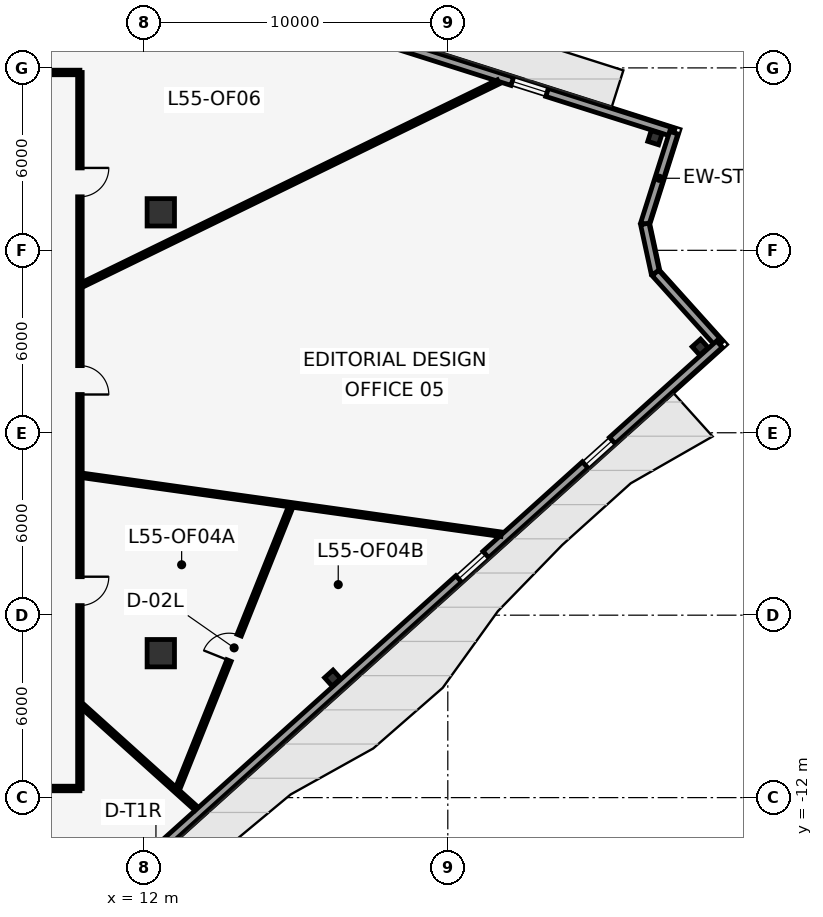
"""IFC4 building model, lengths in metres.
Left out: names, types, materials, properties, quantities, classifications, styles, units other than length and angle.
Written with IfcOpenShell. Run it as: python <this file> out.ifc"""

import sys

from ifc_helpers import new_model, si_unit, direction, frame, frame_2d, origin, origin_2d, place, context, subcontext, project, spatial, rectangle, i_section, extrude, element, fill, save


model = new_model("IFC4")
c1 = context("Model", 3, precision=1e-05, world=origin(), true_north=direction((0.0, 1.0)))
c2 = subcontext(c1, "Body", "Model", "MODEL_VIEW")
j1 = project(units=[si_unit("LENGTHUNIT", "METRE"), si_unit("PLANEANGLEUNIT", "RADIAN")], contexts=[c1])
p1 = place(None, origin())
s1 = spatial("IfcSite", under=j1, at=p1, CompositionType="ELEMENT")
p2 = place(p1, origin())
s2 = spatial("IfcBuilding", under=s1, at=p2, CompositionType="ELEMENT")
p3 = place(p2, frame((0.0, 0.0, 236.3)))
s3 = spatial("IfcBuildingStorey", under=s2, at=p3, CompositionType="ELEMENT", Elevation=236.3)
for number, where, z_axis, x_axis in (
    (1, (12.56, -7.25, 0.0), (0.0, 0.0, 1.0), (1.0, 0.0, 0.0)),
    (2, (12.56, 7.25, 0.0), (0.0, 0.0, 1.0), (1.0, 0.0, 0.0)),
):
    element("IfcColumn", number, at=place(p3, frame(where, z_axis=z_axis, x_axis=x_axis)), inside=s3, PredefinedType="COLUMN", context=c2, shape_type="SweptSolid", body=[
        extrude(rectangle(XDim=0.9, YDim=0.9, at=origin_2d()), origin(), (0.0, 0.0, 1.0), 4.1),
    ])
for number, where, z_axis, x_axis in (
    (3, (18.211, -8.07, 0.0), (0.0, 0.0, 1.0), (0.743, 0.669, 0.0)),
    (4, (30.301, 2.816, 0.0), (0.0, 0.0, 1.0), (0.743, 0.669, 0.0)),
    (5, (28.811, 9.706, 0.0), (0.0, 0.0, 1.0), (-0.953, 0.303, 0.0)),
):
    element("IfcColumn", number, at=place(p3, frame(where, z_axis=z_axis, x_axis=x_axis)), inside=s3, PredefinedType="COLUMN", context=c2, shape_type="SweptSolid", body=[
        extrude(i_section(OverallWidth=0.373, OverallDepth=0.373, WebThickness=0.016, FlangeThickness=0.026, at=origin_2d()), origin(), (0.0, 0.0, 1.0), 4.1),
    ])
p4 = place(p3, frame((-17.407, 24.748, 0.0), z_axis=(0.0, 0.0, 1.0), x_axis=(0.953082756031, -0.302709861346, 0.0)))
e6 = element("IfcWall", 6, at=p4, inside=s3, PredefinedType="STANDARD", context=c2, shape_type="SweptSolid", body=[
    extrude(rectangle(XDim=49.145, YDim=0.28, at=frame_2d((24.573, 0.0))), origin(), (0.0, 0.0, 1.0), 3.85),
])
p5 = place(p4, frame((24.073, 0.0, 0.0)))
e7 = element("IfcOpeningElement", 7, at=p5, cuts=e6, PredefinedType="OPENING", context=c2, shape_type="SweptSolid", body=[
    extrude(rectangle(XDim=1.0, YDim=2.15, at=frame_2d((0.5, 1.075))), frame((0.0, 0.15, 0.0), z_axis=(0.0, -1.0, 0.0), x_axis=(1.0, 0.0, 0.0)), (0.0, 0.0, 1.0), 0.3),
])
p6 = place(p4, frame((4.373, 0.0, 0.85)))
e8 = element("IfcOpeningElement", 8, at=p6, cuts=e6, PredefinedType="OPENING", context=c2, shape_type="SweptSolid", body=[
    extrude(rectangle(XDim=1.2, YDim=2.2, at=frame_2d((0.6, 1.1))), frame((0.0, 0.15, 0.0), z_axis=(0.0, -1.0, 0.0), x_axis=(1.0, 0.0, 0.0)), (0.0, 0.0, 1.0), 0.3),
])
p7 = place(p4, frame((9.973, 0.0, 0.85)))
e9 = element("IfcOpeningElement", 9, at=p7, cuts=e6, PredefinedType="OPENING", context=c2, shape_type="SweptSolid", body=[
    extrude(rectangle(XDim=1.2, YDim=2.2, at=frame_2d((0.6, 1.1))), frame((0.0, 0.15, 0.0), z_axis=(0.0, -1.0, 0.0), x_axis=(1.0, 0.0, 0.0)), (0.0, 0.0, 1.0), 0.3),
])
p8 = place(p4, frame((21.173, 0.0, 0.85)))
e10 = element("IfcOpeningElement", 10, at=p8, cuts=e6, PredefinedType="OPENING", context=c2, shape_type="SweptSolid", body=[
    extrude(rectangle(XDim=1.2, YDim=2.2, at=frame_2d((0.6, 1.1))), frame((0.0, 0.15, 0.0), z_axis=(0.0, -1.0, 0.0), x_axis=(1.0, 0.0, 0.0)), (0.0, 0.0, 1.0), 0.3),
])
p9 = place(p4, frame((37.973, 0.0, 0.85)))
e11 = element("IfcOpeningElement", 11, at=p9, cuts=e6, PredefinedType="OPENING", context=c2, shape_type="SweptSolid", body=[
    extrude(rectangle(XDim=1.2, YDim=2.2, at=frame_2d((0.6, 1.1))), frame((0.0, 0.15, 0.0), z_axis=(0.0, -1.0, 0.0), x_axis=(1.0, 0.0, 0.0)), (0.0, 0.0, 1.0), 0.3),
])
p10 = place(p4, frame((43.573, 0.0, 0.85)))
e12 = element("IfcOpeningElement", 12, at=p10, cuts=e6, PredefinedType="OPENING", context=c2, shape_type="SweptSolid", body=[
    extrude(rectangle(XDim=1.2, YDim=2.2, at=frame_2d((0.6, 1.1))), frame((0.0, 0.15, 0.0), z_axis=(0.0, -1.0, 0.0), x_axis=(1.0, 0.0, 0.0)), (0.0, 0.0, 1.0), 0.3),
])
p11 = place(p3, frame((29.432, 9.871, 0.0), z_axis=(0.0, 0.0, 1.0), x_axis=(-0.30264059672, -0.953104752489, 0.0)))
e13 = element("IfcWall", 13, at=p11, inside=s3, PredefinedType="STANDARD", context=c2, shape_type="SweptSolid", body=[
    extrude(rectangle(XDim=3.15, YDim=0.28, at=frame_2d((1.575, 0.0))), origin(), (0.0, 0.0, 1.0), 3.85),
])
p12 = place(p3, frame((28.479, 6.868, 0.0), z_axis=(0.0, 0.0, 1.0), x_axis=(0.211126358094, -0.977458777094, 0.0)))
e14 = element("IfcWall", 14, at=p12, inside=s3, PredefinedType="STANDARD", context=c2, shape_type="SweptSolid", body=[
    extrude(rectangle(XDim=1.649, YDim=0.28, at=frame_2d((0.824, 0.0))), origin(), (0.0, 0.0, 1.0), 3.85),
])
p13 = place(p3, frame((28.827, 5.257, 0.0), z_axis=(0.0, 0.0, 1.0), x_axis=(0.669127439782, -0.743147676663, 0.0)))
e15 = element("IfcWall", 15, at=p13, inside=s3, PredefinedType="STANDARD", context=c2, shape_type="SweptSolid", body=[
    extrude(rectangle(XDim=3.15, YDim=0.28, at=frame_2d((1.575, 0.0))), origin(), (0.0, 0.0, 1.0), 3.85),
])
p14 = place(p3, frame((30.935, 2.916, 0.0), z_axis=(0.0, 0.0, 1.0), x_axis=(-0.743143233829, -0.66913237406, 0.0)))
e16 = element("IfcWall", 16, at=p14, inside=s3, PredefinedType="STANDARD", context=c2, shape_type="SweptSolid", body=[
    extrude(rectangle(XDim=49.88, YDim=0.28, at=frame_2d((24.94, 0.0))), origin(), (0.0, 0.0, 1.0), 3.85),
])
p15 = place(p14, frame((24.44, 0.0, 0.0)))
e17 = element("IfcOpeningElement", 17, at=p15, cuts=e16, PredefinedType="OPENING", context=c2, shape_type="SweptSolid", body=[
    extrude(rectangle(XDim=1.0, YDim=2.15, at=frame_2d((0.5, 1.075))), frame((0.0, 0.15, 0.0), z_axis=(0.0, -1.0, 0.0), x_axis=(1.0, 0.0, 0.0)), (0.0, 0.0, 1.0), 0.3),
])
p16 = place(p14, frame((4.74, 0.0, 0.85)))
e18 = element("IfcOpeningElement", 18, at=p16, cuts=e16, PredefinedType="OPENING", context=c2, shape_type="SweptSolid", body=[
    extrude(rectangle(XDim=1.2, YDim=2.2, at=frame_2d((0.6, 1.1))), frame((0.0, 0.15, 0.0), z_axis=(0.0, -1.0, 0.0), x_axis=(1.0, 0.0, 0.0)), (0.0, 0.0, 1.0), 0.3),
])
p17 = place(p14, frame((10.34, 0.0, 0.85)))
e19 = element("IfcOpeningElement", 19, at=p17, cuts=e16, PredefinedType="OPENING", context=c2, shape_type="SweptSolid", body=[
    extrude(rectangle(XDim=1.2, YDim=2.2, at=frame_2d((0.6, 1.1))), frame((0.0, 0.15, 0.0), z_axis=(0.0, -1.0, 0.0), x_axis=(1.0, 0.0, 0.0)), (0.0, 0.0, 1.0), 0.3),
])
p18 = place(p14, frame((27.14, 0.0, 0.85)))
e20 = element("IfcOpeningElement", 20, at=p18, cuts=e16, PredefinedType="OPENING", context=c2, shape_type="SweptSolid", body=[
    extrude(rectangle(XDim=1.2, YDim=2.2, at=frame_2d((0.6, 1.1))), frame((0.0, 0.15, 0.0), z_axis=(0.0, -1.0, 0.0), x_axis=(1.0, 0.0, 0.0)), (0.0, 0.0, 1.0), 0.3),
])
p19 = place(p14, frame((38.34, 0.0, 0.85)))
e21 = element("IfcOpeningElement", 21, at=p19, cuts=e16, PredefinedType="OPENING", context=c2, shape_type="SweptSolid", body=[
    extrude(rectangle(XDim=1.2, YDim=2.2, at=frame_2d((0.6, 1.1))), frame((0.0, 0.15, 0.0), z_axis=(0.0, -1.0, 0.0), x_axis=(1.0, 0.0, 0.0)), (0.0, 0.0, 1.0), 0.3),
])
p20 = place(p14, frame((43.94, 0.0, 0.85)))
e22 = element("IfcOpeningElement", 22, at=p20, cuts=e16, PredefinedType="OPENING", context=c2, shape_type="SweptSolid", body=[
    extrude(rectangle(XDim=1.2, YDim=2.2, at=frame_2d((0.6, 1.1))), frame((0.0, 0.15, 0.0), z_axis=(0.0, -1.0, 0.0), x_axis=(1.0, 0.0, 0.0)), (0.0, 0.0, 1.0), 0.3),
])
p21 = place(p3, frame((-2.22, 11.85, 0.0), z_axis=(0.0, 0.0, 1.0), x_axis=(1.0, 0.0, 0.0)))
e23 = element("IfcWall", 23, at=p21, inside=s3, PredefinedType="PARTITIONING", context=c2, shape_type="SweptSolid", body=[
    extrude(rectangle(XDim=12.12, YDim=0.15, at=frame_2d((6.06, 0.0))), origin(), (0.0, 0.0, 1.0), 3.85),
])
p22 = place(p21, frame((4.774, 0.0, 0.0)))
e24 = element("IfcOpeningElement", 24, at=p22, cuts=e23, PredefinedType="OPENING", context=c2, shape_type="SweptSolid", body=[
    extrude(rectangle(XDim=0.95, YDim=2.15, at=frame_2d((0.475, 1.075))), frame((0.0, 0.085, 0.0), z_axis=(0.0, -1.0, 0.0), x_axis=(1.0, 0.0, 0.0)), (0.0, 0.0, 1.0), 0.17),
])
p23 = place(p3, frame((9.9, 11.85, 0.0), z_axis=(0.0, 0.0, 1.0), x_axis=(0.0, -1.0, 0.0)))
e25 = element("IfcWall", 25, at=p23, inside=s3, PredefinedType="PARTITIONING", context=c2, shape_type="SweptSolid", body=[
    extrude(rectangle(XDim=23.55, YDim=0.15, at=frame_2d((11.775, 0.0))), origin(), (0.0, 0.0, 1.0), 3.85),
])
p24 = place(p23, frame((16.585, 0.0, 0.0)))
e26 = element("IfcOpeningElement", 26, at=p24, cuts=e25, PredefinedType="OPENING", context=c2, shape_type="SweptSolid", body=[
    extrude(rectangle(XDim=0.95, YDim=2.15, at=frame_2d((0.475, 1.075))), frame((0.0, 0.085, 0.0), z_axis=(0.0, -1.0, 0.0), x_axis=(1.0, 0.0, 0.0)), (0.0, 0.0, 1.0), 0.17),
])
p25 = place(p23, frame((9.642, 0.0, 0.0)))
e27 = element("IfcOpeningElement", 27, at=p25, cuts=e25, PredefinedType="OPENING", context=c2, shape_type="SweptSolid", body=[
    extrude(rectangle(XDim=0.95, YDim=2.15, at=frame_2d((0.475, 1.075))), frame((0.0, 0.085, 0.0), z_axis=(0.0, -1.0, 0.0), x_axis=(1.0, 0.0, 0.0)), (0.0, 0.0, 1.0), 0.17),
])
p26 = place(p23, frame((3.14, 0.0, 0.0)))
e28 = element("IfcOpeningElement", 28, at=p26, cuts=e25, PredefinedType="OPENING", context=c2, shape_type="SweptSolid", body=[
    extrude(rectangle(XDim=0.95, YDim=2.15, at=frame_2d((0.475, 1.075))), frame((0.0, 0.085, 0.0), z_axis=(0.0, -1.0, 0.0), x_axis=(1.0, 0.0, 0.0)), (0.0, 0.0, 1.0), 0.17),
])
p27 = place(p3, frame((9.9, -11.7, 0.0), z_axis=(0.0, 0.0, 1.0), x_axis=(-1.0, 0.0, 0.0)))
e29 = element("IfcWall", 29, at=p27, inside=s3, PredefinedType="PARTITIONING", context=c2, shape_type="SweptSolid", body=[
    extrude(rectangle(XDim=12.12, YDim=0.15, at=frame_2d((6.06, 0.0))), origin(), (0.0, 0.0, 1.0), 3.85),
])
p28 = place(p27, frame((3.133, 0.0, 0.0)))
e30 = element("IfcOpeningElement", 30, at=p28, cuts=e29, PredefinedType="OPENING", context=c2, shape_type="SweptSolid", body=[
    extrude(rectangle(XDim=0.95, YDim=2.15, at=frame_2d((0.475, 1.075))), frame((0.0, 0.085, 0.0), z_axis=(0.0, -1.0, 0.0), x_axis=(1.0, 0.0, 0.0)), (0.0, 0.0, 1.0), 0.17),
])
p29 = place(p3, frame((10.005, 4.88, 0.0), z_axis=(0.0, 0.0, 1.0), x_axis=(0.89879886383, 0.43836126925, 0.0)))
e31 = element("IfcWall", 31, at=p29, inside=s3, PredefinedType="PARTITIONING", context=c2, shape_type="SweptSolid", body=[
    extrude(rectangle(XDim=15.195, YDim=0.15, at=frame_2d((7.598, 0.0))), origin(), (0.0, 0.0, 1.0), 3.85),
])
p30 = place(p3, frame((6.902, 11.955, 0.0), z_axis=(0.0, 0.0, 1.0), x_axis=(0.500009234706, 0.866020072059, 0.0)))
e32 = element("IfcWall", 32, at=p30, inside=s3, PredefinedType="PARTITIONING", context=c2, shape_type="SweptSolid", body=[
    extrude(rectangle(XDim=4.79, YDim=0.15, at=frame_2d((2.395, 0.0))), origin(), (0.0, 0.0, 1.0), 3.85),
])
p31 = place(p3, frame((10.005, -9.009, 0.0), z_axis=(0.0, 0.0, 1.0), x_axis=(0.743153755308, -0.669120688644, 0.0)))
e33 = element("IfcWall", 33, at=p31, inside=s3, PredefinedType="PARTITIONING", context=c2, shape_type="SweptSolid", body=[
    extrude(rectangle(XDim=5.016, YDim=0.15, at=frame_2d((2.508, 0.0))), origin(), (0.0, 0.0, 1.0), 3.85),
])
p32 = place(p3, frame((10.005, -1.406, 0.0), z_axis=(0.0, 0.0, 1.0), x_axis=(0.990266235932, -0.139186141457, 0.0)))
e34 = element("IfcWall", 34, at=p32, inside=s3, PredefinedType="PARTITIONING", context=c2, shape_type="SweptSolid", body=[
    extrude(rectangle(XDim=13.887, YDim=0.15, at=frame_2d((6.943, 0.0))), origin(), (0.0, 0.0, 1.0), 3.85),
])
p33 = place(p3, frame((13.094, -11.756, 0.0), z_axis=(0.0, 0.0, 1.0), x_axis=(0.372320948008, 0.928104041406, 0.0)))
e35 = element("IfcWall", 35, at=p33, inside=s3, PredefinedType="PARTITIONING", context=c2, shape_type="SweptSolid", body=[
    extrude(rectangle(XDim=10.088, YDim=0.15, at=frame_2d((5.044, 0.0))), origin(), (0.0, 0.0, 1.0), 3.85),
])
p34 = place(p33, frame((4.594, 0.0, 0.0)))
e36 = element("IfcOpeningElement", 36, at=p34, cuts=e35, PredefinedType="OPENING", context=c2, shape_type="SweptSolid", body=[
    extrude(rectangle(XDim=0.9, YDim=2.1, at=frame_2d((0.45, 1.05))), frame((0.0, 0.085, 0.0), z_axis=(0.0, -1.0, 0.0), x_axis=(1.0, 0.0, 0.0)), (0.0, 0.0, 1.0), 0.17),
])
p35 = place(p10, origin())
e37 = element("IfcWindow", 37, at=p35, inside=s3, PartitioningType="SINGLE_PANEL", PredefinedType="WINDOW", context=c2, shape_type="SweptSolid", body=[
    extrude(rectangle(XDim=1.2, YDim=2.2, at=frame_2d((0.6, 1.1))), frame((0.0, 0.03, 0.0), z_axis=(0.0, -1.0, 0.0), x_axis=(1.0, 0.0, 0.0)), (0.0, 0.0, 1.0), 0.06),
])
fill(e12, e37)
p36 = place(p16, origin())
e38 = element("IfcWindow", 38, at=p36, inside=s3, PartitioningType="SINGLE_PANEL", PredefinedType="WINDOW", context=c2, shape_type="SweptSolid", body=[
    extrude(rectangle(XDim=1.2, YDim=2.2, at=frame_2d((0.6, 1.1))), frame((0.0, 0.03, 0.0), z_axis=(0.0, -1.0, 0.0), x_axis=(1.0, 0.0, 0.0)), (0.0, 0.0, 1.0), 0.06),
])
fill(e18, e38)
p37 = place(p17, origin())
e39 = element("IfcWindow", 39, at=p37, inside=s3, PartitioningType="SINGLE_PANEL", PredefinedType="WINDOW", context=c2, shape_type="SweptSolid", body=[
    extrude(rectangle(XDim=1.2, YDim=2.2, at=frame_2d((0.6, 1.1))), frame((0.0, 0.03, 0.0), z_axis=(0.0, -1.0, 0.0), x_axis=(1.0, 0.0, 0.0)), (0.0, 0.0, 1.0), 0.06),
])
fill(e19, e39)
p38 = place(p34, origin())
e40 = element("IfcDoor", 40, at=p38, inside=s3, OperationType="SINGLE_SWING_LEFT", PredefinedType="DOOR", context=c2, shape_type="SweptSolid", body=[
    extrude(rectangle(XDim=0.9, YDim=2.1, at=frame_2d((0.45, 1.05))), frame((0.0, 0.025, 0.0), z_axis=(0.0, -1.0, 0.0), x_axis=(1.0, 0.0, 0.0)), (0.0, 0.0, 1.0), 0.05),
])
fill(e36, e40)
p39 = place(p24, origin())
e41 = element("IfcDoor", 41, at=p39, inside=s3, OperationType="SINGLE_SWING_LEFT", PredefinedType="DOOR", context=c2, shape_type="SweptSolid", body=[
    extrude(rectangle(XDim=0.95, YDim=2.15, at=frame_2d((0.475, 1.075))), frame((0.0, 0.025, 0.0), z_axis=(0.0, -1.0, 0.0), x_axis=(1.0, 0.0, 0.0)), (0.0, 0.0, 1.0), 0.05),
])
fill(e26, e41)
p40 = place(p25, origin())
e42 = element("IfcDoor", 42, at=p40, inside=s3, OperationType="SINGLE_SWING_RIGHT", PredefinedType="DOOR", context=c2, shape_type="SweptSolid", body=[
    extrude(rectangle(XDim=0.95, YDim=2.15, at=frame_2d((0.475, 1.075))), frame((0.0, 0.025, 0.0), z_axis=(0.0, -1.0, 0.0), x_axis=(1.0, 0.0, 0.0)), (0.0, 0.0, 1.0), 0.05),
])
fill(e27, e42)
p41 = place(p26, origin())
e43 = element("IfcDoor", 43, at=p41, inside=s3, OperationType="SINGLE_SWING_LEFT", PredefinedType="DOOR", context=c2, shape_type="SweptSolid", body=[
    extrude(rectangle(XDim=0.95, YDim=2.15, at=frame_2d((0.475, 1.075))), frame((0.0, 0.025, 0.0), z_axis=(0.0, -1.0, 0.0), x_axis=(1.0, 0.0, 0.0)), (0.0, 0.0, 1.0), 0.05),
])
fill(e28, e43)
save(model, sys.argv[1])
